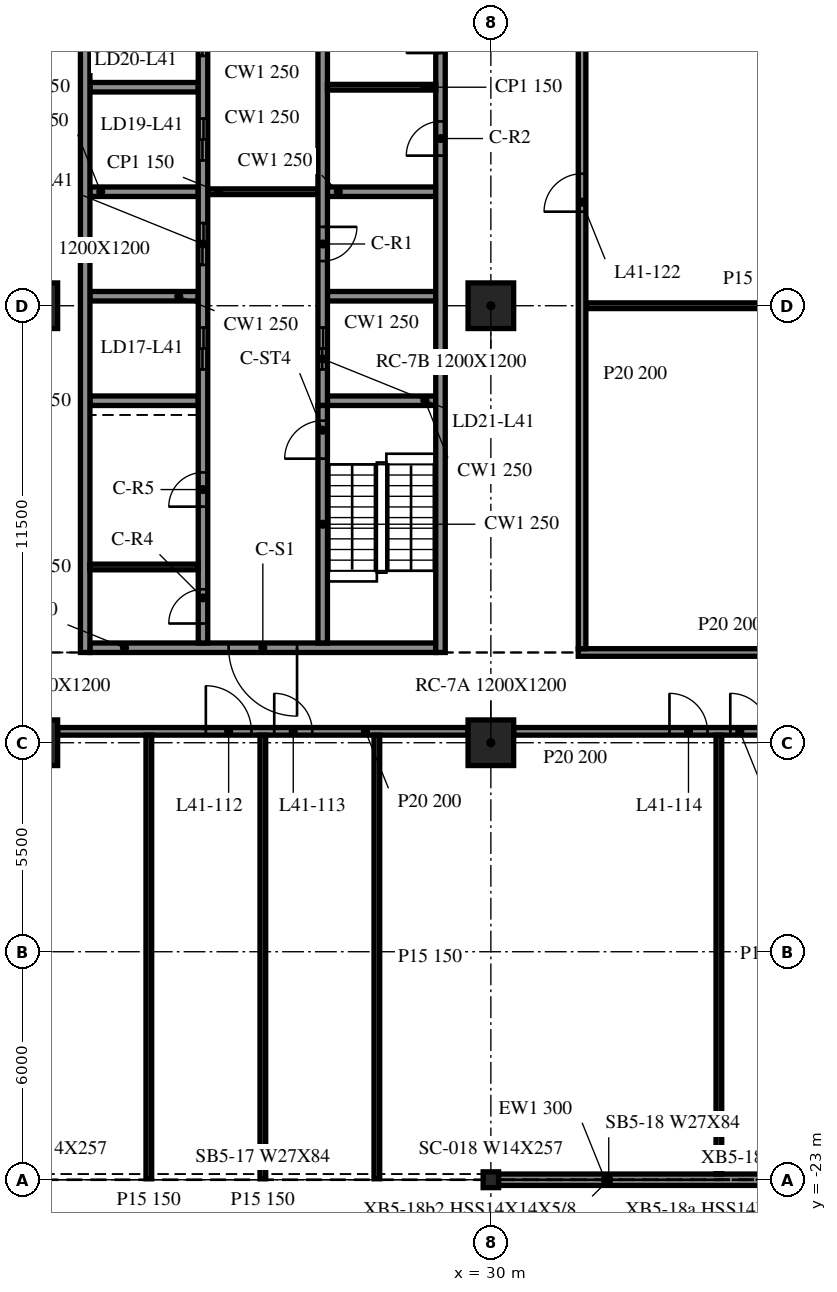
"""IFC4 building model, lengths in metres.
Left out: names, types, materials, properties, quantities, classifications, styles, units other than length and angle.
Written with IfcOpenShell. Run it as: python <this file> out.ifc"""

import sys

from ifc_helpers import new_model, si_unit, direction, frame, frame_2d, origin, origin_2d, place, context, subcontext, project, spatial, rectangle, i_section, extrude, element, fill, save


model = new_model("IFC4")
c1 = context("Model", 3, precision=1e-05, world=origin(), true_north=direction((0.0, 1.0)))
c2 = subcontext(c1, "Body", "Model", "MODEL_VIEW")
j1 = project(units=[si_unit("LENGTHUNIT", "METRE"), si_unit("PLANEANGLEUNIT", "RADIAN")], contexts=[c1])
p1 = place(None, origin())
s1 = spatial("IfcSite", under=j1, at=p1, CompositionType="ELEMENT")
p2 = place(p1, origin())
s2 = spatial("IfcBuilding", under=s1, at=p2, CompositionType="ELEMENT")
p3 = place(p2, frame((0.0, 0.0, 174.4)))
s3 = spatial("IfcBuildingStorey", under=s2, at=p3, CompositionType="ELEMENT", Elevation=174.4)
for number, where, z_axis, x_axis in (
    (1, (18.0, -11.5, -0.34), (0.0, 0.0, 1.0), (1.0, 0.0, 0.0)),
    (2, (18.0, 0.0, -0.34), (0.0, 0.0, 1.0), (1.0, 0.0, 0.0)),
    (3, (30.0, -11.5, -0.34), (0.0, 0.0, 1.0), (1.0, 0.0, 0.0)),
    (4, (30.0, 0.0, -0.34), (0.0, 0.0, 1.0), (1.0, 0.0, 0.0)),
):
    element("IfcColumn", number, at=place(p3, frame(where, z_axis=z_axis, x_axis=x_axis)), inside=s3, PredefinedType="COLUMN", context=c2, shape_type="SweptSolid", body=[
        extrude(rectangle(XDim=1.2, YDim=1.2, at=origin_2d()), origin(), (0.0, 0.0, 1.0), 3.8),
    ])
p4 = place(p3, frame((30.0, -23.0, -0.34), z_axis=(0.0, 0.0, 1.0), x_axis=(1.0, 0.0, 0.0)))
e5 = element("IfcColumn", 5, at=p4, inside=s3, PredefinedType="COLUMN", context=c2, shape_type="SweptSolid", body=[
    extrude(i_section(OverallWidth=0.406, OverallDepth=0.417, WebThickness=0.03, FlangeThickness=0.048, at=origin_2d()), origin(), (0.0, 0.0, 1.0), 3.8),
])
p5 = place(p3, frame((30.015, -23.0, 0.0), z_axis=(0.0, 0.0, 1.0), x_axis=(1.0, 0.0, 0.0)))
e6 = element("IfcWall", 6, at=p5, inside=s3, PredefinedType="NOTDEFINED", context=c2, shape_type="SweptSolid", body=[
    extrude(rectangle(XDim=11.97, YDim=0.3, at=frame_2d((5.985, 0.0))), origin(), (0.0, 0.0, 1.0), 2.782),
])
p6 = place(p3, frame((19.325, 15.125, 0.0), z_axis=(0.0, 0.0, 1.0), x_axis=(0.0, -1.0, 0.0)))
e7 = element("IfcWall", 7, at=p6, inside=s3, PredefinedType="SOLIDWALL", context=c2, shape_type="SweptSolid", body=[
    extrude(rectangle(XDim=24.25, YDim=0.25, at=frame_2d((12.125, 0.0))), origin(), (0.0, 0.0, 1.0), 3.46),
])
p7 = place(p3, frame((28.675, -9.125, 0.0), z_axis=(0.0, 0.0, 1.0), x_axis=(0.0, 1.0, 0.0)))
e8 = element("IfcWall", 8, at=p7, inside=s3, PredefinedType="SOLIDWALL", context=c2, shape_type="SweptSolid", body=[
    extrude(rectangle(XDim=24.25, YDim=0.25, at=frame_2d((12.125, 0.0))), origin(), (0.0, 0.0, 1.0), 3.46),
])
p8 = place(p7, frame((13.075, 0.0, 0.0)))
e9 = element("IfcOpeningElement", 9, at=p8, cuts=e8, PredefinedType="OPENING", context=c2, shape_type="SweptSolid", body=[
    extrude(rectangle(XDim=0.9, YDim=2.1, at=frame_2d((0.45, 1.05))), frame((0.0, 0.135, 0.0), z_axis=(0.0, -1.0, 0.0), x_axis=(1.0, 0.0, 0.0)), (0.0, 0.0, 1.0), 0.27),
])
p9 = place(p7, frame((15.775, 0.0, 0.0)))
e10 = element("IfcOpeningElement", 10, at=p9, cuts=e8, PredefinedType="OPENING", context=c2, shape_type="SweptSolid", body=[
    extrude(rectangle(XDim=0.9, YDim=2.1, at=frame_2d((0.45, 1.05))), frame((0.0, 0.135, 0.0), z_axis=(0.0, -1.0, 0.0), x_axis=(1.0, 0.0, 0.0)), (0.0, 0.0, 1.0), 0.27),
])
p10 = place(p7, frame((19.125, 0.0, 0.0)))
e11 = element("IfcOpeningElement", 11, at=p10, cuts=e8, PredefinedType="OPENING", context=c2, shape_type="SweptSolid", body=[
    extrude(rectangle(XDim=0.9, YDim=2.1, at=frame_2d((0.45, 1.05))), frame((0.0, 0.135, 0.0), z_axis=(0.0, -1.0, 0.0), x_axis=(1.0, 0.0, 0.0)), (0.0, 0.0, 1.0), 0.27),
])
p11 = place(p7, frame((22.327, 0.0, 0.0)))
e12 = element("IfcOpeningElement", 12, at=p11, cuts=e8, PredefinedType="OPENING", context=c2, shape_type="SweptSolid", body=[
    extrude(rectangle(XDim=0.9, YDim=2.1, at=frame_2d((0.45, 1.05))), frame((0.0, 0.135, 0.0), z_axis=(0.0, -1.0, 0.0), x_axis=(1.0, 0.0, 0.0)), (0.0, 0.0, 1.0), 0.27),
])
p12 = place(p3, frame((28.55, -9.0, 0.0), z_axis=(0.0, 0.0, 1.0), x_axis=(-1.0, 0.0, 0.0)))
e13 = element("IfcWall", 13, at=p12, inside=s3, PredefinedType="SOLIDWALL", context=c2, shape_type="SweptSolid", body=[
    extrude(rectangle(XDim=9.1, YDim=0.25, at=frame_2d((4.55, 0.0))), origin(), (0.0, 0.0, 1.0), 3.46),
])
p13 = place(p12, frame((3.65, 0.0, 0.0)))
e14 = element("IfcOpeningElement", 14, at=p13, cuts=e13, PredefinedType="OPENING", context=c2, shape_type="SweptSolid", body=[
    extrude(rectangle(XDim=1.8, YDim=2.1, at=frame_2d((0.9, 1.05))), frame((0.0, 0.135, 0.0), z_axis=(0.0, -1.0, 0.0), x_axis=(1.0, 0.0, 0.0)), (0.0, 0.0, 1.0), 0.27),
])
p14 = place(p3, frame((22.425, -8.875, 0.0), z_axis=(0.0, 0.0, 1.0), x_axis=(0.0, 1.0, 0.0)))
e15 = element("IfcWall", 15, at=p14, inside=s3, PredefinedType="SOLIDWALL", context=c2, shape_type="SweptSolid", body=[
    extrude(rectangle(XDim=17.5, YDim=0.25, at=frame_2d((8.75, 0.0))), origin(), (0.0, 0.0, 1.0), 3.46),
])
p15 = place(p14, frame((7.2, 0.0, 0.0)))
e16 = element("IfcOpeningElement", 16, at=p15, cuts=e15, PredefinedType="OPENING", context=c2, shape_type="SweptSolid", body=[
    extrude(rectangle(XDim=1.1, YDim=2.1, at=frame_2d((0.55, 1.05))), frame((0.0, 0.135, 0.0), z_axis=(0.0, -1.0, 0.0), x_axis=(1.0, 0.0, 0.0)), (0.0, 0.0, 1.0), 0.27),
])
p16 = place(p14, frame((9.95, 0.0, 0.0)))
e17 = element("IfcOpeningElement", 17, at=p16, cuts=e15, PredefinedType="OPENING", context=c2, shape_type="SweptSolid", body=[
    extrude(rectangle(XDim=1.1, YDim=2.1, at=frame_2d((0.55, 1.05))), frame((0.0, 0.135, 0.0), z_axis=(0.0, -1.0, 0.0), x_axis=(1.0, 0.0, 0.0)), (0.0, 0.0, 1.0), 0.27),
])
p17 = place(p14, frame((12.7, 0.0, 0.0)))
e18 = element("IfcOpeningElement", 18, at=p17, cuts=e15, PredefinedType="OPENING", context=c2, shape_type="SweptSolid", body=[
    extrude(rectangle(XDim=1.1, YDim=2.1, at=frame_2d((0.55, 1.05))), frame((0.0, 0.135, 0.0), z_axis=(0.0, -1.0, 0.0), x_axis=(1.0, 0.0, 0.0)), (0.0, 0.0, 1.0), 0.27),
])
p18 = place(p14, frame((15.45, 0.0, 0.0)))
e19 = element("IfcOpeningElement", 19, at=p18, cuts=e15, PredefinedType="OPENING", context=c2, shape_type="SweptSolid", body=[
    extrude(rectangle(XDim=1.1, YDim=2.1, at=frame_2d((0.55, 1.05))), frame((0.0, 0.135, 0.0), z_axis=(0.0, -1.0, 0.0), x_axis=(1.0, 0.0, 0.0)), (0.0, 0.0, 1.0), 0.27),
])
p19 = place(p14, frame((0.512, 0.0, 0.0)))
e20 = element("IfcOpeningElement", 20, at=p19, cuts=e15, PredefinedType="OPENING", context=c2, shape_type="SweptSolid", body=[
    extrude(rectangle(XDim=0.9, YDim=2.1, at=frame_2d((0.45, 1.05))), frame((0.0, 0.135, 0.0), z_axis=(0.0, -1.0, 0.0), x_axis=(1.0, 0.0, 0.0)), (0.0, 0.0, 1.0), 0.27),
])
p20 = place(p14, frame((3.587, 0.0, 0.0)))
e21 = element("IfcOpeningElement", 21, at=p20, cuts=e15, PredefinedType="OPENING", context=c2, shape_type="SweptSolid", body=[
    extrude(rectangle(XDim=0.9, YDim=2.1, at=frame_2d((0.45, 1.05))), frame((0.0, 0.135, 0.0), z_axis=(0.0, -1.0, 0.0), x_axis=(1.0, 0.0, 0.0)), (0.0, 0.0, 1.0), 0.27),
])
p21 = place(p3, frame((25.575, -8.875, 0.0), z_axis=(0.0, 0.0, 1.0), x_axis=(0.0, 1.0, 0.0)))
e22 = element("IfcWall", 22, at=p21, inside=s3, PredefinedType="SOLIDWALL", context=c2, shape_type="SweptSolid", body=[
    extrude(rectangle(XDim=6.25, YDim=0.25, at=frame_2d((3.125, 0.0))), origin(), (0.0, 0.0, 1.0), 3.46),
])
p22 = place(p21, frame((4.85, 0.0, 0.0)))
e23 = element("IfcOpeningElement", 23, at=p22, cuts=e22, PredefinedType="OPENING", context=c2, shape_type="SweptSolid", body=[
    extrude(rectangle(XDim=1.0, YDim=2.1, at=frame_2d((0.5, 1.05))), frame((0.0, 0.135, 0.0), z_axis=(0.0, -1.0, 0.0), x_axis=(1.0, 0.0, 0.0)), (0.0, 0.0, 1.0), 0.27),
])
p23 = place(p3, frame((25.575, 14.875, 0.0), z_axis=(0.0, 0.0, 1.0), x_axis=(0.0, -1.0, 0.0)))
e24 = element("IfcWall", 24, at=p23, inside=s3, PredefinedType="SOLIDWALL", context=c2, shape_type="SweptSolid", body=[
    extrude(rectangle(XDim=17.5, YDim=0.25, at=frame_2d((8.75, 0.0))), origin(), (0.0, 0.0, 1.0), 3.46),
])
p24 = place(p23, frame((15.45, 0.0, 0.0)))
e25 = element("IfcOpeningElement", 25, at=p24, cuts=e24, PredefinedType="OPENING", context=c2, shape_type="SweptSolid", body=[
    extrude(rectangle(XDim=1.1, YDim=2.1, at=frame_2d((0.55, 1.05))), frame((0.0, 0.135, 0.0), z_axis=(0.0, -1.0, 0.0), x_axis=(1.0, 0.0, 0.0)), (0.0, 0.0, 1.0), 0.27),
])
p25 = place(p23, frame((12.8, 0.0, 0.0)))
e26 = element("IfcOpeningElement", 26, at=p25, cuts=e24, PredefinedType="OPENING", context=c2, shape_type="SweptSolid", body=[
    extrude(rectangle(XDim=0.9, YDim=2.1, at=frame_2d((0.45, 1.05))), frame((0.0, 0.135, 0.0), z_axis=(0.0, -1.0, 0.0), x_axis=(1.0, 0.0, 0.0)), (0.0, 0.0, 1.0), 0.27),
])
for number, where, z_axis, x_axis in (
    (27, (19.45, -2.5, 0.0), (0.0, 0.0, 1.0), (1.0, 0.0, 0.0)),
    (28, (19.45, 0.25, 0.0), (0.0, 0.0, 1.0), (1.0, 0.0, 0.0)),
    (29, (19.45, 3.0, 0.0), (0.0, 0.0, 1.0), (1.0, 0.0, 0.0)),
    (30, (19.45, 5.75, 0.0), (0.0, 0.0, 1.0), (1.0, 0.0, 0.0)),
    (31, (25.7, -2.5, 0.0), (0.0, 0.0, 1.0), (1.0, 0.0, 0.0)),
    (32, (25.7, 0.25, 0.0), (0.0, 0.0, 1.0), (1.0, 0.0, 0.0)),
    (33, (25.7, 3.0, 0.0), (0.0, 0.0, 1.0), (1.0, 0.0, 0.0)),
):
    element("IfcWall", number, at=place(p3, frame(where, z_axis=z_axis, x_axis=x_axis)), inside=s3, PredefinedType="SOLIDWALL", context=c2, shape_type="SweptSolid", body=[
        extrude(rectangle(XDim=2.85, YDim=0.25, at=frame_2d((1.425, 0.0))), origin(), (0.0, 0.0, 1.0), 3.46),
    ])
p26 = place(p3, frame((22.55, 3.0, 0.0), z_axis=(0.0, 0.0, 1.0), x_axis=(1.0, 0.0, 0.0)))
e34 = element("IfcWall", 34, at=p26, inside=s3, PredefinedType="PARTITIONING", context=c2, shape_type="SweptSolid", body=[
    extrude(rectangle(XDim=2.9, YDim=0.15, at=frame_2d((1.45, 0.0))), origin(), (0.0, 0.0, 1.0), 3.46),
])
for number, where, z_axis, x_axis in (
    (35, (25.7, 5.75, 0.0), (0.0, 0.0, 1.0), (1.0, 0.0, 0.0)),
    (36, (19.45, -6.875, 0.0), (0.0, 0.0, 1.0), (1.0, 0.0, 0.0)),
):
    element("IfcWall", number, at=place(p3, frame(where, z_axis=z_axis, x_axis=x_axis)), inside=s3, PredefinedType="PARTITIONING", context=c2, shape_type="SweptSolid", body=[
        extrude(rectangle(XDim=2.85, YDim=0.15, at=frame_2d((1.425, 0.0))), origin(), (0.0, 0.0, 1.0), 3.46),
    ])
p27 = place(p3, frame((18.6, -11.2, 0.0), z_axis=(0.0, 0.0, 1.0), x_axis=(1.0, 0.0, 0.0)))
e37 = element("IfcWall", 37, at=p27, inside=s3, PredefinedType="PARTITIONING", context=c2, shape_type="SweptSolid", body=[
    extrude(rectangle(XDim=10.8, YDim=0.2, at=frame_2d((5.4, 0.0))), origin(), (0.0, 0.0, 1.0), 3.46),
])
p28 = place(p27, frame((3.9, 0.0, 0.0)))
e38 = element("IfcOpeningElement", 38, at=p28, cuts=e37, PredefinedType="OPENING", context=c2, shape_type="SweptSolid", body=[
    extrude(rectangle(XDim=1.2, YDim=2.1, at=frame_2d((0.6, 1.05))), frame((0.0, 0.11, 0.0), z_axis=(0.0, -1.0, 0.0), x_axis=(1.0, 0.0, 0.0)), (0.0, 0.0, 1.0), 0.22),
])
p29 = place(p27, frame((5.7, 0.0, 0.0)))
e39 = element("IfcOpeningElement", 39, at=p29, cuts=e37, PredefinedType="OPENING", context=c2, shape_type="SweptSolid", body=[
    extrude(rectangle(XDim=1.0, YDim=2.1, at=frame_2d((0.5, 1.05))), frame((0.0, 0.11, 0.0), z_axis=(0.0, -1.0, 0.0), x_axis=(1.0, 0.0, 0.0)), (0.0, 0.0, 1.0), 0.22),
])
p30 = place(p3, frame((30.6, -11.2, 0.0), z_axis=(0.0, 0.0, 1.0), x_axis=(1.0, 0.0, 0.0)))
e40 = element("IfcWall", 40, at=p30, inside=s3, PredefinedType="PARTITIONING", context=c2, shape_type="SweptSolid", body=[
    extrude(rectangle(XDim=10.8, YDim=0.2, at=frame_2d((5.4, 0.0))), origin(), (0.0, 0.0, 1.0), 3.46),
])
p31 = place(p30, frame((4.1, 0.0, 0.0)))
e41 = element("IfcOpeningElement", 41, at=p31, cuts=e40, PredefinedType="OPENING", context=c2, shape_type="SweptSolid", body=[
    extrude(rectangle(XDim=1.0, YDim=2.1, at=frame_2d((0.5, 1.05))), frame((0.0, 0.11, 0.0), z_axis=(0.0, -1.0, 0.0), x_axis=(1.0, 0.0, 0.0)), (0.0, 0.0, 1.0), 0.22),
])
p32 = place(p30, frame((5.7, 0.0, 0.0)))
e42 = element("IfcOpeningElement", 42, at=p32, cuts=e40, PredefinedType="OPENING", context=c2, shape_type="SweptSolid", body=[
    extrude(rectangle(XDim=1.0, YDim=2.1, at=frame_2d((0.5, 1.05))), frame((0.0, 0.11, 0.0), z_axis=(0.0, -1.0, 0.0), x_axis=(1.0, 0.0, 0.0)), (0.0, 0.0, 1.0), 0.22),
])
p33 = place(p3, frame((32.3, -9.125, 0.0), z_axis=(0.0, 0.0, 1.0), x_axis=(1.0, 0.0, 0.0)))
e43 = element("IfcWall", 43, at=p33, inside=s3, PredefinedType="PARTITIONING", context=c2, shape_type="SweptSolid", body=[
    extrude(rectangle(XDim=15.675, YDim=0.2, at=frame_2d((7.837, 0.0))), origin(), (0.0, 0.0, 1.0), 3.46),
])
p34 = place(p33, frame((7.1, 0.0, 0.0)))
e44 = element("IfcOpeningElement", 44, at=p34, cuts=e43, PredefinedType="OPENING", context=c2, shape_type="SweptSolid", body=[
    extrude(rectangle(XDim=1.2, YDim=2.1, at=frame_2d((0.6, 1.05))), frame((0.0, 0.11, 0.0), z_axis=(0.0, -1.0, 0.0), x_axis=(1.0, 0.0, 0.0)), (0.0, 0.0, 1.0), 0.22),
])
p35 = place(p3, frame((32.5, 0.0, 0.0), z_axis=(0.0, 0.0, 1.0), x_axis=(1.0, 0.0, 0.0)))
e45 = element("IfcWall", 45, at=p35, inside=s3, PredefinedType="PARTITIONING", context=c2, shape_type="SweptSolid", body=[
    extrude(rectangle(XDim=8.9, YDim=0.15, at=frame_2d((4.45, 0.0))), origin(), (0.0, 0.0, 1.0), 3.46),
])
for number, where, z_axis, x_axis in (
    (46, (21.0, -22.975, 0.0), (0.0, 0.0, 1.0), (0.0, 1.0, 0.0)),
    (47, (24.0, -22.975, 0.0), (0.0, 0.0, 1.0), (0.0, 1.0, 0.0)),
    (48, (27.0, -22.975, 0.0), (0.0, 0.0, 1.0), (0.0, 1.0, 0.0)),
):
    element("IfcWall", number, at=place(p3, frame(where, z_axis=z_axis, x_axis=x_axis)), inside=s3, PredefinedType="PARTITIONING", context=c2, shape_type="SweptSolid", body=[
        extrude(rectangle(XDim=11.675, YDim=0.15, at=frame_2d((5.837, 0.0))), origin(), (0.0, 0.0, 1.0), 3.46),
    ])
p36 = place(p3, frame((32.4, -9.025, 0.0), z_axis=(0.0, 0.0, 1.0), x_axis=(0.0, 1.0, 0.0)))
e49 = element("IfcWall", 49, at=p36, inside=s3, PredefinedType="PARTITIONING", context=c2, shape_type="SweptSolid", body=[
    extrude(rectangle(XDim=24.05, YDim=0.2, at=frame_2d((12.025, 0.0))), origin(), (0.0, 0.0, 1.0), 3.46),
])
p37 = place(p36, frame((11.5, 0.0, 0.0)))
e50 = element("IfcOpeningElement", 50, at=p37, cuts=e49, PredefinedType="OPENING", context=c2, shape_type="SweptSolid", body=[
    extrude(rectangle(XDim=1.0, YDim=2.1, at=frame_2d((0.5, 1.05))), frame((0.0, 0.11, 0.0), z_axis=(0.0, -1.0, 0.0), x_axis=(1.0, 0.0, 0.0)), (0.0, 0.0, 1.0), 0.22),
])
p38 = place(p3, frame((36.0, -22.85, 0.0), z_axis=(0.0, 0.0, 1.0), x_axis=(0.0, 1.0, 0.0)))
e51 = element("IfcWall", 51, at=p38, inside=s3, PredefinedType="PARTITIONING", context=c2, shape_type="SweptSolid", body=[
    extrude(rectangle(XDim=11.55, YDim=0.15, at=frame_2d((5.775, 0.0))), origin(), (0.0, 0.0, 1.0), 3.46),
])
p39 = place(p13, origin())
e52 = element("IfcDoor", 52, at=p39, inside=s3, OperationType="DOUBLE_DOOR_SINGLE_SWING", PredefinedType="DOOR", context=c2, shape_type="SweptSolid", body=[
    extrude(rectangle(XDim=1.8, YDim=2.1, at=frame_2d((0.9, 1.05))), frame((0.0, 0.025, 0.0), z_axis=(0.0, -1.0, 0.0), x_axis=(1.0, 0.0, 0.0)), (0.0, 0.0, 1.0), 0.05),
])
fill(e14, e52)
p40 = place(p24, origin())
e53 = element("IfcDoor", 53, at=p40, inside=s3, OperationType="DOUBLE_DOOR_SLIDING", PredefinedType="DOOR", context=c2, shape_type="SweptSolid", body=[
    extrude(rectangle(XDim=1.1, YDim=2.1, at=frame_2d((0.55, 1.05))), frame((0.0, 0.025, 0.0), z_axis=(0.0, -1.0, 0.0), x_axis=(1.0, 0.0, 0.0)), (0.0, 0.0, 1.0), 0.05),
])
fill(e25, e53)
p41 = place(p15, origin())
e54 = element("IfcDoor", 54, at=p41, inside=s3, OperationType="DOUBLE_DOOR_SLIDING", PredefinedType="DOOR", context=c2, shape_type="SweptSolid", body=[
    extrude(rectangle(XDim=1.1, YDim=2.1, at=frame_2d((0.55, 1.05))), frame((0.0, 0.025, 0.0), z_axis=(0.0, -1.0, 0.0), x_axis=(1.0, 0.0, 0.0)), (0.0, 0.0, 1.0), 0.05),
])
fill(e16, e54)
p42 = place(p16, origin())
e55 = element("IfcDoor", 55, at=p42, inside=s3, OperationType="DOUBLE_DOOR_SLIDING", PredefinedType="DOOR", context=c2, shape_type="SweptSolid", body=[
    extrude(rectangle(XDim=1.1, YDim=2.1, at=frame_2d((0.55, 1.05))), frame((0.0, 0.025, 0.0), z_axis=(0.0, -1.0, 0.0), x_axis=(1.0, 0.0, 0.0)), (0.0, 0.0, 1.0), 0.05),
])
fill(e17, e55)
p43 = place(p17, origin())
e56 = element("IfcDoor", 56, at=p43, inside=s3, OperationType="DOUBLE_DOOR_SLIDING", PredefinedType="DOOR", context=c2, shape_type="SweptSolid", body=[
    extrude(rectangle(XDim=1.1, YDim=2.1, at=frame_2d((0.55, 1.05))), frame((0.0, 0.025, 0.0), z_axis=(0.0, -1.0, 0.0), x_axis=(1.0, 0.0, 0.0)), (0.0, 0.0, 1.0), 0.05),
])
fill(e18, e56)
p44 = place(p18, origin())
e57 = element("IfcDoor", 57, at=p44, inside=s3, OperationType="DOUBLE_DOOR_SLIDING", PredefinedType="DOOR", context=c2, shape_type="SweptSolid", body=[
    extrude(rectangle(XDim=1.1, YDim=2.1, at=frame_2d((0.55, 1.05))), frame((0.0, 0.025, 0.0), z_axis=(0.0, -1.0, 0.0), x_axis=(1.0, 0.0, 0.0)), (0.0, 0.0, 1.0), 0.05),
])
fill(e19, e57)
p45 = place(p25, origin())
e58 = element("IfcDoor", 58, at=p45, inside=s3, OperationType="SINGLE_SWING_LEFT", PredefinedType="DOOR", context=c2, shape_type="SweptSolid", body=[
    extrude(rectangle(XDim=0.9, YDim=2.1, at=frame_2d((0.45, 1.05))), frame((0.0, 0.025, 0.0), z_axis=(0.0, -1.0, 0.0), x_axis=(1.0, 0.0, 0.0)), (0.0, 0.0, 1.0), 0.05),
])
fill(e26, e58)
p46 = place(p8, origin())
e59 = element("IfcDoor", 59, at=p46, inside=s3, OperationType="SINGLE_SWING_RIGHT", PredefinedType="DOOR", context=c2, shape_type="SweptSolid", body=[
    extrude(rectangle(XDim=0.9, YDim=2.1, at=frame_2d((0.45, 1.05))), frame((0.0, 0.025, 0.0), z_axis=(0.0, -1.0, 0.0), x_axis=(1.0, 0.0, 0.0)), (0.0, 0.0, 1.0), 0.05),
])
fill(e9, e59)
p47 = place(p9, origin())
e60 = element("IfcDoor", 60, at=p47, inside=s3, OperationType="SINGLE_SWING_LEFT", PredefinedType="DOOR", context=c2, shape_type="SweptSolid", body=[
    extrude(rectangle(XDim=0.9, YDim=2.1, at=frame_2d((0.45, 1.05))), frame((0.0, 0.025, 0.0), z_axis=(0.0, -1.0, 0.0), x_axis=(1.0, 0.0, 0.0)), (0.0, 0.0, 1.0), 0.05),
])
fill(e10, e60)
p48 = place(p19, origin())
e61 = element("IfcDoor", 61, at=p48, inside=s3, OperationType="SINGLE_SWING_RIGHT", PredefinedType="DOOR", context=c2, shape_type="SweptSolid", body=[
    extrude(rectangle(XDim=0.9, YDim=2.1, at=frame_2d((0.45, 1.05))), frame((0.0, 0.025, 0.0), z_axis=(0.0, -1.0, 0.0), x_axis=(1.0, 0.0, 0.0)), (0.0, 0.0, 1.0), 0.05),
])
fill(e20, e61)
p49 = place(p20, origin())
e62 = element("IfcDoor", 62, at=p49, inside=s3, OperationType="SINGLE_SWING_LEFT", PredefinedType="DOOR", context=c2, shape_type="SweptSolid", body=[
    extrude(rectangle(XDim=0.9, YDim=2.1, at=frame_2d((0.45, 1.05))), frame((0.0, 0.025, 0.0), z_axis=(0.0, -1.0, 0.0), x_axis=(1.0, 0.0, 0.0)), (0.0, 0.0, 1.0), 0.05),
])
fill(e21, e62)
p50 = place(p22, origin())
e63 = element("IfcDoor", 63, at=p50, inside=s3, OperationType="SINGLE_SWING_LEFT", PredefinedType="DOOR", context=c2, shape_type="SweptSolid", body=[
    extrude(rectangle(XDim=1.0, YDim=2.1, at=frame_2d((0.5, 1.05))), frame((0.0, 0.025, 0.0), z_axis=(0.0, -1.0, 0.0), x_axis=(1.0, 0.0, 0.0)), (0.0, 0.0, 1.0), 0.05),
])
fill(e23, e63)
p51 = place(p28, origin())
e64 = element("IfcDoor", 64, at=p51, inside=s3, OperationType="SINGLE_SWING_RIGHT", PredefinedType="DOOR", context=c2, shape_type="SweptSolid", body=[
    extrude(rectangle(XDim=1.2, YDim=2.1, at=frame_2d((0.6, 1.05))), frame((0.0, 0.025, 0.0), z_axis=(0.0, -1.0, 0.0), x_axis=(1.0, 0.0, 0.0)), (0.0, 0.0, 1.0), 0.05),
])
fill(e38, e64)
p52 = place(p29, origin())
e65 = element("IfcDoor", 65, at=p52, inside=s3, OperationType="SINGLE_SWING_LEFT", PredefinedType="DOOR", context=c2, shape_type="SweptSolid", body=[
    extrude(rectangle(XDim=1.0, YDim=2.1, at=frame_2d((0.5, 1.05))), frame((0.0, 0.025, 0.0), z_axis=(0.0, -1.0, 0.0), x_axis=(1.0, 0.0, 0.0)), (0.0, 0.0, 1.0), 0.05),
])
fill(e39, e65)
p53 = place(p31, origin())
e66 = element("IfcDoor", 66, at=p53, inside=s3, OperationType="SINGLE_SWING_RIGHT", PredefinedType="DOOR", context=c2, shape_type="SweptSolid", body=[
    extrude(rectangle(XDim=1.0, YDim=2.1, at=frame_2d((0.5, 1.05))), frame((0.0, 0.025, 0.0), z_axis=(0.0, -1.0, 0.0), x_axis=(1.0, 0.0, 0.0)), (0.0, 0.0, 1.0), 0.05),
])
fill(e41, e66)
p54 = place(p32, origin())
e67 = element("IfcDoor", 67, at=p54, inside=s3, OperationType="SINGLE_SWING_LEFT", PredefinedType="DOOR", context=c2, shape_type="SweptSolid", body=[
    extrude(rectangle(XDim=1.0, YDim=2.1, at=frame_2d((0.5, 1.05))), frame((0.0, 0.025, 0.0), z_axis=(0.0, -1.0, 0.0), x_axis=(1.0, 0.0, 0.0)), (0.0, 0.0, 1.0), 0.05),
])
fill(e42, e67)
p55 = place(p37, origin())
e68 = element("IfcDoor", 68, at=p55, inside=s3, OperationType="SINGLE_SWING_RIGHT", PredefinedType="DOOR", context=c2, shape_type="SweptSolid", body=[
    extrude(rectangle(XDim=1.0, YDim=2.1, at=frame_2d((0.5, 1.05))), frame((0.0, 0.025, 0.0), z_axis=(0.0, -1.0, 0.0), x_axis=(1.0, 0.0, 0.0)), (0.0, 0.0, 1.0), 0.05),
])
fill(e50, e68)
save(model, sys.argv[1])
